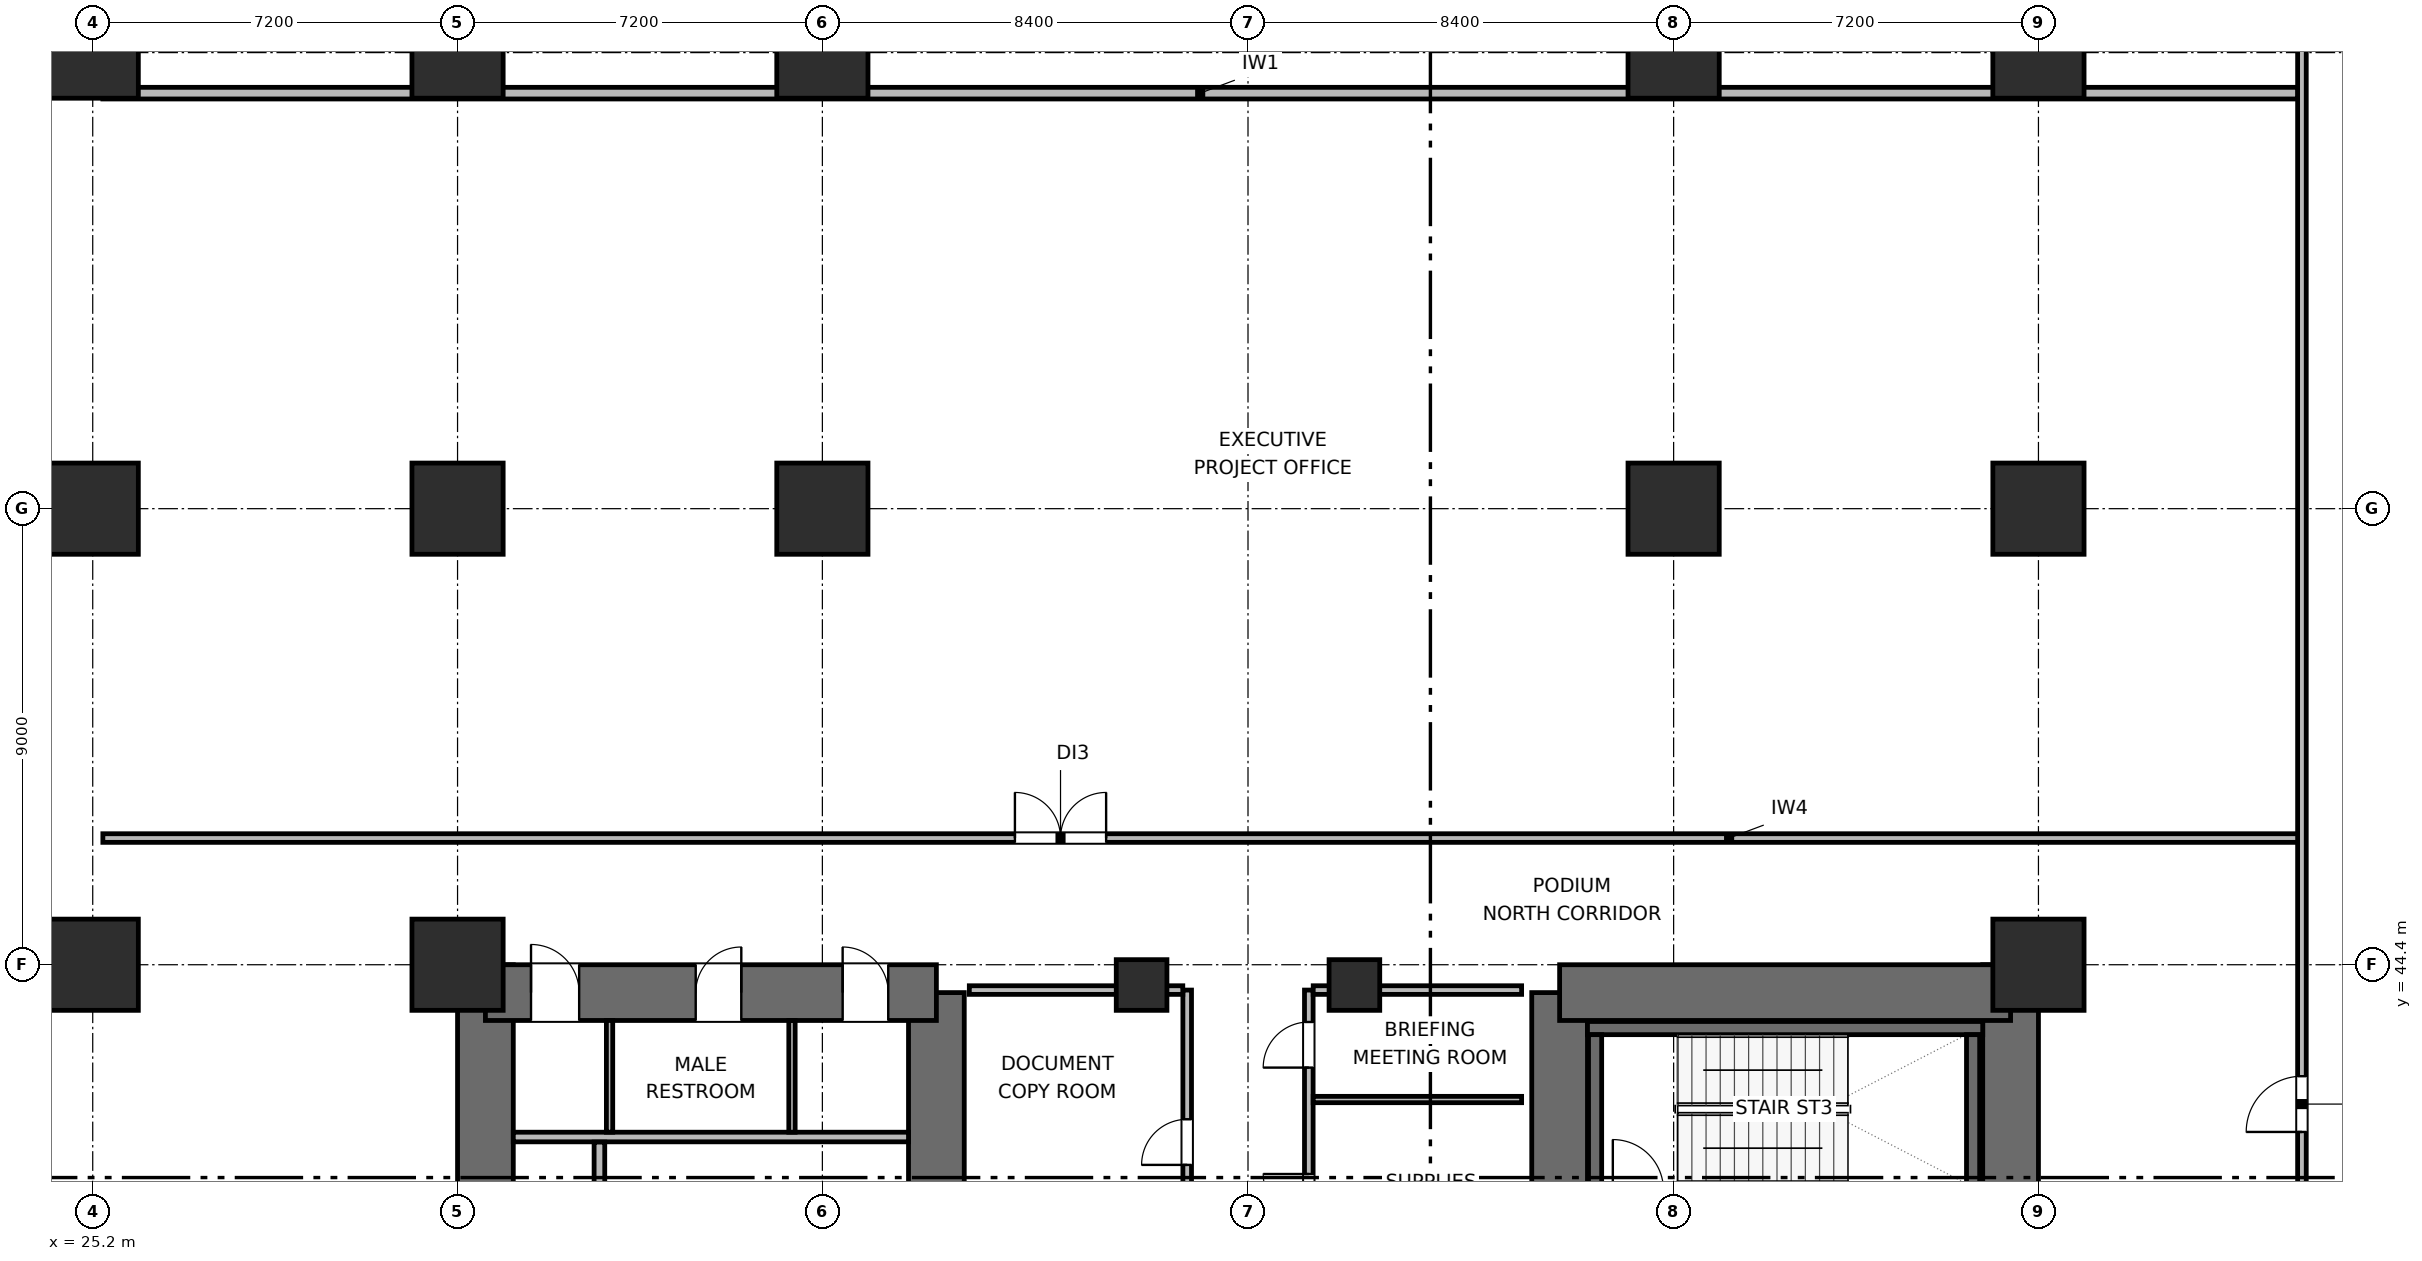
"""IFC4 building model, lengths in metres.
Left out: names, types, materials, properties, quantities, classifications, styles, units other than length and angle.
Written with IfcOpenShell. Run it as: python <this file> out.ifc"""

import sys

from ifc_helpers import new_model, si_unit, direction, frame, frame_2d, origin, origin_2d, place, context, subcontext, project, spatial, rectangle, extrude, element, fill, save


model = new_model("IFC4")
c1 = context("Model", 3, precision=1e-05, world=origin(), true_north=direction((0.0, 1.0)))
c2 = subcontext(c1, "Body", "Model", "MODEL_VIEW")
j1 = project(units=[si_unit("LENGTHUNIT", "METRE"), si_unit("PLANEANGLEUNIT", "RADIAN")], contexts=[c1])
p1 = place(None, origin())
s1 = spatial("IfcSite", under=j1, at=p1, CompositionType="ELEMENT")
p2 = place(p1, origin())
s2 = spatial("IfcBuilding", under=s1, at=p2, CompositionType="ELEMENT")
p3 = place(p2, frame((0.0, 0.0, 17.1)))
s3 = spatial("IfcBuildingStorey", under=s2, at=p3, CompositionType="ELEMENT", Elevation=17.1)
p4 = place(p3, frame((32.95, 27.6, 0.0), z_axis=(0.0, 0.0, 1.0), x_axis=(0.0, 1.0, 0.0)))
e1 = element("IfcWall", 1, at=p4, inside=s3, PredefinedType="SHEAR", context=c2, shape_type="SweptSolid", body=[
    extrude(rectangle(XDim=16.8, YDim=1.1, at=frame_2d((8.4, 0.0))), origin(), (0.0, 0.0, 1.0), 4.5),
])
p5 = place(p3, frame((41.85, 37.8, 0.0), z_axis=(0.0, 0.0, 1.0), x_axis=(0.0, 1.0, 0.0)))
e2 = element("IfcWall", 2, at=p5, inside=s3, PredefinedType="SHEAR", context=c2, shape_type="SweptSolid", body=[
    extrude(rectangle(XDim=6.05, YDim=1.1, at=frame_2d((3.025, 0.0))), origin(), (0.0, 0.0, 1.0), 4.5),
])
p6 = place(p3, frame((32.95, 43.85, 0.0), z_axis=(0.0, 0.0, 1.0), x_axis=(1.0, 0.0, 0.0)))
e3 = element("IfcWall", 3, at=p6, inside=s3, PredefinedType="SHEAR", context=c2, shape_type="SweptSolid", body=[
    extrude(rectangle(XDim=8.9, YDim=1.1, at=frame_2d((4.45, 0.0))), origin(), (0.0, 0.0, 1.0), 4.5),
])
p7 = place(p6, frame((0.9, 0.0, 0.0)))
e4 = element("IfcOpeningElement", 4, at=p7, cuts=e3, PredefinedType="OPENING", context=c2, shape_type="SweptSolid", body=[
    extrude(rectangle(XDim=0.95, YDim=2.04, at=frame_2d((0.475, 1.02))), frame((0.0, 0.56, 0.0), z_axis=(0.0, -1.0, 0.0), x_axis=(1.0, 0.0, 0.0)), (0.0, 0.0, 1.0), 1.12),
])
p8 = place(p6, frame((4.15, 0.0, 0.0)))
e5 = element("IfcOpeningElement", 5, at=p8, cuts=e3, PredefinedType="OPENING", context=c2, shape_type="SweptSolid", body=[
    extrude(rectangle(XDim=0.9, YDim=2.02, at=frame_2d((0.45, 1.01))), frame((0.0, 0.56, 0.0), z_axis=(0.0, -1.0, 0.0), x_axis=(1.0, 0.0, 0.0)), (0.0, 0.0, 1.0), 1.12),
])
p9 = place(p6, frame((7.05, 0.0, 0.0)))
e6 = element("IfcOpeningElement", 6, at=p9, cuts=e3, PredefinedType="OPENING", context=c2, shape_type="SweptSolid", body=[
    extrude(rectangle(XDim=0.9, YDim=2.02, at=frame_2d((0.45, 1.01))), frame((0.0, 0.56, 0.0), z_axis=(0.0, -1.0, 0.0), x_axis=(1.0, 0.0, 0.0)), (0.0, 0.0, 1.0), 1.12),
])
p10 = place(p3, frame((54.15, 38.0, 0.0), z_axis=(0.0, 0.0, 1.0), x_axis=(0.0, 1.0, 0.0)))
e7 = element("IfcWall", 7, at=p10, inside=s3, PredefinedType="SHEAR", context=c2, shape_type="SweptSolid", body=[
    extrude(rectangle(XDim=5.85, YDim=1.1, at=frame_2d((2.925, 0.0))), origin(), (0.0, 0.0, 1.0), 4.5),
])
p11 = place(p3, frame((63.05, 27.6, 0.0), z_axis=(0.0, 0.0, 1.0), x_axis=(0.0, 1.0, 0.0)))
e8 = element("IfcWall", 8, at=p11, inside=s3, PredefinedType="SHEAR", context=c2, shape_type="SweptSolid", body=[
    extrude(rectangle(XDim=16.8, YDim=1.1, at=frame_2d((8.4, 0.0))), origin(), (0.0, 0.0, 1.0), 4.5),
])
p12 = place(p3, frame((54.15, 43.85, 0.0), z_axis=(0.0, 0.0, 1.0), x_axis=(1.0, 0.0, 0.0)))
e9 = element("IfcWall", 9, at=p12, inside=s3, PredefinedType="SHEAR", context=c2, shape_type="SweptSolid", body=[
    extrude(rectangle(XDim=8.9, YDim=1.1, at=frame_2d((4.45, 0.0))), origin(), (0.0, 0.0, 1.0), 4.5),
])
p13 = place(p3, frame((54.7, 43.15, 0.0), z_axis=(0.0, 0.0, 1.0), x_axis=(1.0, 0.0, 0.0)))
e10 = element("IfcWall", 10, at=p13, inside=s3, PredefinedType="SHEAR", context=c2, shape_type="SweptSolid", body=[
    extrude(rectangle(XDim=7.8, YDim=0.26, at=frame_2d((3.9, 0.0))), origin(), (0.0, 0.0, 1.0), 4.5),
])
for number, where, z_axis, x_axis in (
    (11, (54.85, 40.08, 0.0), (0.0, 0.0, 1.0), (0.0, 1.0, 0.0)),
    (12, (62.31, 40.08, 0.0), (0.0, 0.0, 1.0), (0.0, 1.0, 0.0)),
):
    element("IfcWall", number, at=place(p3, frame(where, z_axis=z_axis, x_axis=x_axis)), inside=s3, PredefinedType="SHEAR", context=c2, shape_type="SweptSolid", body=[
        extrude(rectangle(XDim=2.94, YDim=0.26, at=frame_2d((1.47, 0.0))), origin(), (0.0, 0.0, 1.0), 4.5),
    ])
for number, where, z_axis, x_axis in (
    (13, (25.2, 44.4, 0.0), (0.0, 0.0, 1.0), (1.0, 0.0, 0.0)),
    (14, (25.2, 53.4, 0.0), (0.0, 0.0, 1.0), (1.0, 0.0, 0.0)),
    (15, (25.2, 62.4, 0.0), (0.0, 0.0, 1.0), (1.0, 0.0, 0.0)),
    (16, (32.4, 44.4, 0.0), (0.0, 0.0, 1.0), (1.0, 0.0, 0.0)),
    (17, (32.4, 53.4, 0.0), (0.0, 0.0, 1.0), (1.0, 0.0, 0.0)),
    (18, (32.4, 62.4, 0.0), (0.0, 0.0, 1.0), (1.0, 0.0, 0.0)),
    (19, (39.6, 53.4, 0.0), (0.0, 0.0, 1.0), (1.0, 0.0, 0.0)),
    (20, (39.6, 62.4, 0.0), (0.0, 0.0, 1.0), (1.0, 0.0, 0.0)),
    (21, (56.4, 53.4, 0.0), (0.0, 0.0, 1.0), (1.0, 0.0, 0.0)),
    (22, (56.4, 62.4, 0.0), (0.0, 0.0, 1.0), (1.0, 0.0, 0.0)),
    (23, (63.6, 44.4, 0.0), (0.0, 0.0, 1.0), (1.0, 0.0, 0.0)),
    (24, (63.6, 53.4, 0.0), (0.0, 0.0, 1.0), (1.0, 0.0, 0.0)),
    (25, (63.6, 62.4, 0.0), (0.0, 0.0, 1.0), (1.0, 0.0, 0.0)),
):
    element("IfcColumn", number, at=place(p3, frame(where, z_axis=z_axis, x_axis=x_axis)), inside=s3, PredefinedType="COLUMN", context=c2, shape_type="SweptSolid", body=[
        extrude(rectangle(XDim=1.8, YDim=1.8, at=origin_2d()), origin(), (0.0, 0.0, 1.0), 4.5),
    ])
for number, where, z_axis, x_axis in (
    (26, (45.9, 44.0, 0.0), (0.0, 0.0, 1.0), (1.0, 0.0, 0.0)),
    (27, (50.1, 44.0, 0.0), (0.0, 0.0, 1.0), (1.0, 0.0, 0.0)),
):
    element("IfcColumn", number, at=place(p3, frame(where, z_axis=z_axis, x_axis=x_axis)), inside=s3, PredefinedType="COLUMN", context=c2, shape_type="SweptSolid", body=[
        extrude(rectangle(XDim=1.0, YDim=1.0, at=origin_2d()), origin(), (0.0, 0.0, 1.0), 4.5),
    ])
p14 = place(p3, frame((33.5, 41.0, 0.0), z_axis=(0.0, 0.0, 1.0), x_axis=(1.0, 0.0, 0.0)))
e28 = element("IfcWall", 28, at=p14, inside=s3, PredefinedType="PLUMBINGWALL", context=c2, shape_type="SweptSolid", body=[
    extrude(rectangle(XDim=7.8, YDim=0.19, at=frame_2d((3.9, 0.0))), origin(), (0.0, 0.0, 1.0), 4.24),
])
for number, where, z_axis, x_axis in (
    (29, (35.4, 41.095, 0.0), (0.0, 0.0, 1.0), (0.0, 1.0, 0.0)),
    (30, (39.0, 41.095, 0.0), (0.0, 0.0, 1.0), (0.0, 1.0, 0.0)),
):
    element("IfcWall", number, at=place(p3, frame(where, z_axis=z_axis, x_axis=x_axis)), inside=s3, PredefinedType="PARTITIONING", context=c2, shape_type="SweptSolid", body=[
        extrude(rectangle(XDim=2.205, YDim=0.125, at=frame_2d((1.103, 0.0))), origin(), (0.0, 0.0, 1.0), 4.24),
    ])
p15 = place(p3, frame((35.2, 39.58, 0.0), z_axis=(0.0, 0.0, 1.0), x_axis=(0.0, 1.0, 0.0)))
e31 = element("IfcWall", 31, at=p15, inside=s3, PredefinedType="PARTITIONING", context=c2, shape_type="SweptSolid", body=[
    extrude(rectangle(XDim=1.32, YDim=0.21, at=frame_2d((0.66, 0.0))), origin(), (0.0, 0.0, 1.0), 4.24),
])
p16 = place(p3, frame((46.8, 37.9, 0.0), z_axis=(0.0, 0.0, 1.0), x_axis=(0.0, 1.0, 0.0)))
e32 = element("IfcWall", 32, at=p16, inside=s3, PredefinedType="PARTITIONING", context=c2, shape_type="SweptSolid", body=[
    extrude(rectangle(XDim=6.0, YDim=0.17, at=frame_2d((3.0, 0.0))), origin(), (0.0, 0.0, 1.0), 4.24),
])
p17 = place(p16, frame((2.55, 0.0, 0.0)))
e33 = element("IfcOpeningElement", 33, at=p17, cuts=e32, PredefinedType="OPENING", context=c2, shape_type="SweptSolid", body=[
    extrude(rectangle(XDim=0.9, YDim=2.02, at=frame_2d((0.45, 1.01))), frame((0.0, 0.095, 0.0), z_axis=(0.0, -1.0, 0.0), x_axis=(1.0, 0.0, 0.0)), (0.0, 0.0, 1.0), 0.19),
])
p18 = place(p3, frame((42.5, 43.9, 0.0), z_axis=(0.0, 0.0, 1.0), x_axis=(1.0, 0.0, 0.0)))
e34 = element("IfcWall", 34, at=p18, inside=s3, PredefinedType="PARTITIONING", context=c2, shape_type="SweptSolid", body=[
    extrude(rectangle(XDim=4.213, YDim=0.17, at=frame_2d((2.106, 0.0))), origin(), (0.0, 0.0, 1.0), 3.125),
])
p19 = place(p3, frame((49.2, 37.9, 0.0), z_axis=(0.0, 0.0, 1.0), x_axis=(0.0, 1.0, 0.0)))
e35 = element("IfcWall", 35, at=p19, inside=s3, PredefinedType="PARTITIONING", context=c2, shape_type="SweptSolid", body=[
    extrude(rectangle(XDim=6.0, YDim=0.17, at=frame_2d((3.0, 0.0))), origin(), (0.0, 0.0, 1.0), 4.24),
])
p20 = place(p19, frame((1.47, 0.0, 0.0)))
e36 = element("IfcOpeningElement", 36, at=p20, cuts=e35, PredefinedType="OPENING", context=c2, shape_type="SweptSolid", body=[
    extrude(rectangle(XDim=0.9, YDim=2.02, at=frame_2d((0.45, 1.01))), frame((0.0, 0.095, 0.0), z_axis=(0.0, -1.0, 0.0), x_axis=(1.0, 0.0, 0.0)), (0.0, 0.0, 1.0), 0.19),
])
p21 = place(p19, frame((4.47, 0.0, 0.0)))
e37 = element("IfcOpeningElement", 37, at=p21, cuts=e35, PredefinedType="OPENING", context=c2, shape_type="SweptSolid", body=[
    extrude(rectangle(XDim=0.9, YDim=2.02, at=frame_2d((0.45, 1.01))), frame((0.0, 0.095, 0.0), z_axis=(0.0, -1.0, 0.0), x_axis=(1.0, 0.0, 0.0)), (0.0, 0.0, 1.0), 0.19),
])
p22 = place(p3, frame((49.287, 43.9, 0.0), z_axis=(0.0, 0.0, 1.0), x_axis=(1.0, 0.0, 0.0)))
e38 = element("IfcWall", 38, at=p22, inside=s3, PredefinedType="PARTITIONING", context=c2, shape_type="SweptSolid", body=[
    extrude(rectangle(XDim=4.113, YDim=0.17, at=frame_2d((2.056, 0.0))), origin(), (0.0, 0.0, 1.0), 3.125),
])
p23 = place(p3, frame((49.287, 41.74, 0.0), z_axis=(0.0, 0.0, 1.0), x_axis=(1.0, 0.0, 0.0)))
e39 = element("IfcWall", 39, at=p23, inside=s3, PredefinedType="PARTITIONING", context=c2, shape_type="SweptSolid", body=[
    extrude(rectangle(XDim=4.113, YDim=0.125, at=frame_2d((2.056, 0.0))), origin(), (0.0, 0.0, 1.0), 4.24),
])
p24 = place(p3, frame((25.4, 46.9, 0.0), z_axis=(0.0, 0.0, 1.0), x_axis=(1.0, 0.0, 0.0)))
e40 = element("IfcWall", 40, at=p24, inside=s3, PredefinedType="PARTITIONING", context=c2, shape_type="SweptSolid", body=[
    extrude(rectangle(XDim=43.4, YDim=0.17, at=frame_2d((21.7, 0.0))), origin(), (0.0, 0.0, 1.0), 4.24),
])
p25 = place(p24, frame((18.0, 0.0, 0.0)))
e41 = element("IfcOpeningElement", 41, at=p25, cuts=e40, PredefinedType="OPENING", context=c2, shape_type="SweptSolid", body=[
    extrude(rectangle(XDim=1.8, YDim=2.06, at=frame_2d((0.9, 1.03))), frame((0.0, 0.095, 0.0), z_axis=(0.0, -1.0, 0.0), x_axis=(1.0, 0.0, 0.0)), (0.0, 0.0, 1.0), 0.19),
])
p26 = place(p3, frame((68.8, 25.187, 0.0), z_axis=(0.0, 0.0, 1.0), x_axis=(0.0, 1.0, 0.0)))
e42 = element("IfcWall", 42, at=p26, inside=s3, PredefinedType="PARTITIONING", context=c2, shape_type="SweptSolid", body=[
    extrude(rectangle(XDim=46.448, YDim=0.17, at=frame_2d((23.224, 0.0))), origin(), (0.0, 0.0, 1.0), 4.24),
])
p27 = place(p26, frame((15.913, 0.0, 0.0)))
e43 = element("IfcOpeningElement", 43, at=p27, cuts=e42, PredefinedType="OPENING", context=c2, shape_type="SweptSolid", body=[
    extrude(rectangle(XDim=1.1, YDim=2.05, at=frame_2d((0.55, 1.025))), frame((0.0, 0.095, 0.0), z_axis=(0.0, -1.0, 0.0), x_axis=(1.0, 0.0, 0.0)), (0.0, 0.0, 1.0), 0.19),
])
p28 = place(p3, frame((25.4, 61.6, 0.0), z_axis=(0.0, 0.0, 1.0), x_axis=(1.0, 0.0, 0.0)))
e44 = element("IfcWall", 44, at=p28, inside=s3, PredefinedType="PARTITIONING", context=c2, shape_type="SweptSolid", body=[
    extrude(rectangle(XDim=43.313, YDim=0.23, at=frame_2d((21.656, 0.0))), origin(), (0.0, 0.0, 1.0), 4.24),
])
p29 = place(p7, origin())
e45 = element("IfcDoor", 45, at=p29, inside=s3, OperationType="SINGLE_SWING_LEFT", PredefinedType="DOOR", context=c2, shape_type="SweptSolid", body=[
    extrude(rectangle(XDim=0.95, YDim=2.04, at=frame_2d((0.475, 1.02))), frame((0.0, 0.025, 0.0), z_axis=(0.0, -1.0, 0.0), x_axis=(1.0, 0.0, 0.0)), (0.0, 0.0, 1.0), 0.05),
])
fill(e4, e45)
p30 = place(p8, origin())
e46 = element("IfcDoor", 46, at=p30, inside=s3, OperationType="SINGLE_SWING_RIGHT", PredefinedType="DOOR", context=c2, shape_type="SweptSolid", body=[
    extrude(rectangle(XDim=0.9, YDim=2.02, at=frame_2d((0.45, 1.01))), frame((0.0, 0.025, 0.0), z_axis=(0.0, -1.0, 0.0), x_axis=(1.0, 0.0, 0.0)), (0.0, 0.0, 1.0), 0.05),
])
fill(e5, e46)
p31 = place(p9, origin())
e47 = element("IfcDoor", 47, at=p31, inside=s3, OperationType="SINGLE_SWING_LEFT", PredefinedType="DOOR", context=c2, shape_type="SweptSolid", body=[
    extrude(rectangle(XDim=0.9, YDim=2.02, at=frame_2d((0.45, 1.01))), frame((0.0, 0.025, 0.0), z_axis=(0.0, -1.0, 0.0), x_axis=(1.0, 0.0, 0.0)), (0.0, 0.0, 1.0), 0.05),
])
fill(e6, e47)
p32 = place(p17, origin())
e48 = element("IfcDoor", 48, at=p32, inside=s3, OperationType="SINGLE_SWING_LEFT", PredefinedType="DOOR", context=c2, shape_type="SweptSolid", body=[
    extrude(rectangle(XDim=0.9, YDim=2.02, at=frame_2d((0.45, 1.01))), frame((0.0, 0.025, 0.0), z_axis=(0.0, -1.0, 0.0), x_axis=(1.0, 0.0, 0.0)), (0.0, 0.0, 1.0), 0.05),
])
fill(e33, e48)
p33 = place(p20, origin())
e49 = element("IfcDoor", 49, at=p33, inside=s3, OperationType="SINGLE_SWING_RIGHT", PredefinedType="DOOR", context=c2, shape_type="SweptSolid", body=[
    extrude(rectangle(XDim=0.9, YDim=2.02, at=frame_2d((0.45, 1.01))), frame((0.0, 0.025, 0.0), z_axis=(0.0, -1.0, 0.0), x_axis=(1.0, 0.0, 0.0)), (0.0, 0.0, 1.0), 0.05),
])
fill(e36, e49)
p34 = place(p21, origin())
e50 = element("IfcDoor", 50, at=p34, inside=s3, OperationType="SINGLE_SWING_LEFT", PredefinedType="DOOR", context=c2, shape_type="SweptSolid", body=[
    extrude(rectangle(XDim=0.9, YDim=2.02, at=frame_2d((0.45, 1.01))), frame((0.0, 0.025, 0.0), z_axis=(0.0, -1.0, 0.0), x_axis=(1.0, 0.0, 0.0)), (0.0, 0.0, 1.0), 0.05),
])
fill(e37, e50)
p35 = place(p25, origin())
e51 = element("IfcDoor", 51, at=p35, inside=s3, OperationType="DOUBLE_DOOR_SINGLE_SWING", PredefinedType="DOOR", context=c2, shape_type="SweptSolid", body=[
    extrude(rectangle(XDim=1.8, YDim=2.06, at=frame_2d((0.9, 1.03))), frame((0.0, 0.025, 0.0), z_axis=(0.0, -1.0, 0.0), x_axis=(1.0, 0.0, 0.0)), (0.0, 0.0, 1.0), 0.05),
])
fill(e41, e51)
p36 = place(p27, origin())
e52 = element("IfcDoor", 52, at=p36, inside=s3, OperationType="SINGLE_SWING_LEFT", PredefinedType="DOOR", context=c2, shape_type="SweptSolid", body=[
    extrude(rectangle(XDim=1.1, YDim=2.05, at=frame_2d((0.55, 1.025))), frame((0.0, 0.025, 0.0), z_axis=(0.0, -1.0, 0.0), x_axis=(1.0, 0.0, 0.0)), (0.0, 0.0, 1.0), 0.05),
])
fill(e43, e52)
save(model, sys.argv[1])
